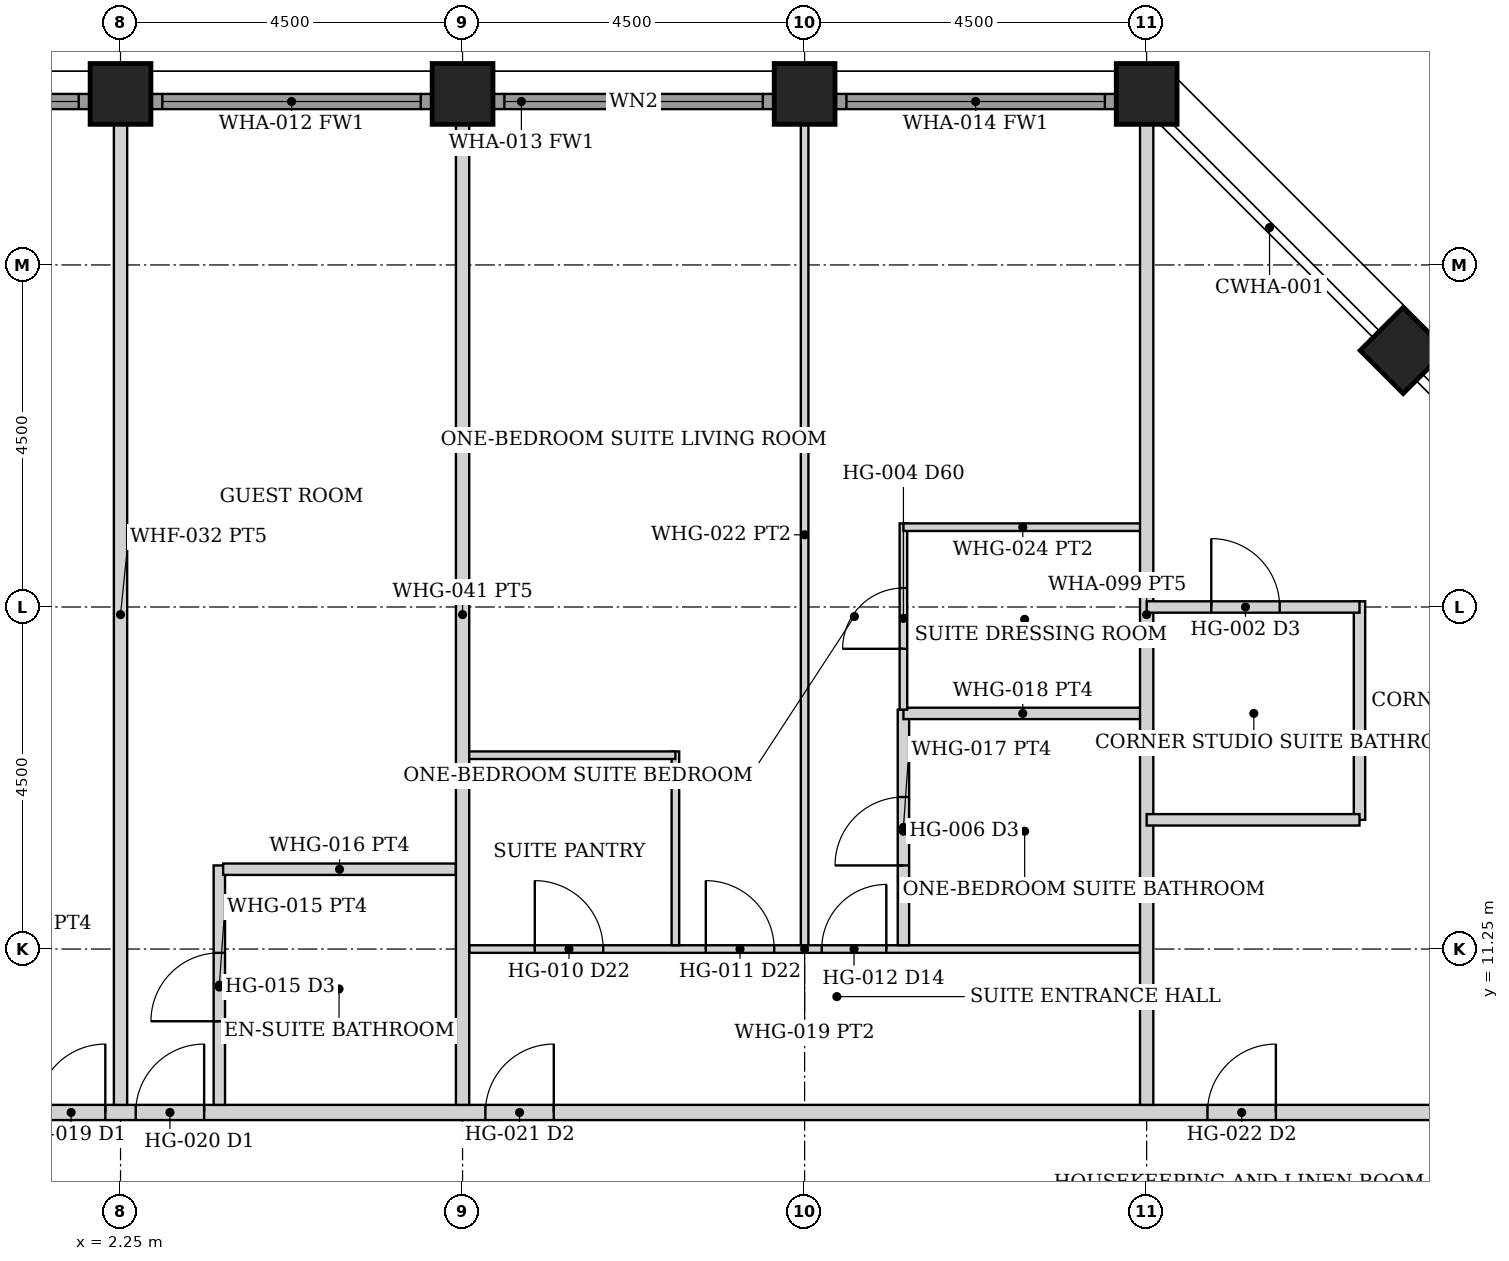
"""IFC4 building model, lengths in metres.
Left out: names, types, materials, properties, quantities, classifications, styles, units other than length and angle.
Written with IfcOpenShell. Run it as: python <this file> out.ifc"""

import sys

from ifc_helpers import new_model, si_unit, direction, frame, frame_2d, origin, origin_2d, place, context, subcontext, project, spatial, rectangle, hollow_rectangle, extrude, element, fill, save


model = new_model("IFC4")
c1 = context("Model", 3, precision=1e-05, world=origin(), true_north=direction((0.0, 1.0)))
c2 = subcontext(c1, "Body", "Model", "MODEL_VIEW")
j1 = project(units=[si_unit("LENGTHUNIT", "METRE"), si_unit("PLANEANGLEUNIT", "RADIAN")], contexts=[c1])
p1 = place(None, origin())
s1 = spatial("IfcSite", under=j1, at=p1, CompositionType="ELEMENT")
p2 = place(p1, origin())
s2 = spatial("IfcBuilding", under=s1, at=p2, CompositionType="ELEMENT")
p3 = place(p2, frame((0.0, 0.0, 183.2)))
s3 = spatial("IfcBuildingStorey", under=s2, at=p3, CompositionType="ELEMENT", Elevation=183.2)
for number, where, z_axis, x_axis in (
    (1, (2.25, 22.5, 0.0), (0.0, 0.0, 1.0), (0.0, 1.0, 0.0)),
    (2, (6.75, 22.5, 0.0), (0.0, 0.0, 1.0), (0.0, 1.0, 0.0)),
    (3, (11.25, 22.5, 0.0), (0.0, 0.0, 1.0), (0.0, 1.0, 0.0)),
    (4, (15.75, 22.5, 0.0), (0.0, 0.0, 1.0), (0.0, 1.0, 0.0)),
    (5, (19.125, 19.125, 0.0), (0.0, 0.0, 1.0), (0.707, 0.707, 0.0)),
):
    element("IfcColumn", number, at=place(p3, frame(where, z_axis=z_axis, x_axis=x_axis)), inside=s3, PredefinedType="COLUMN", context=c2, shape_type="SweptSolid", body=[
        extrude(hollow_rectangle(XDim=0.8, YDim=0.8, WallThickness=0.045, at=origin_2d()), origin(), (0.0, 0.0, 1.0), 3.6),
    ])
p4 = place(p3, frame((-1.845, 22.4, 0.0), z_axis=(0.0, 0.0, 1.0), x_axis=(1.0, 0.0, 0.0)))
e6 = element("IfcWall", 6, at=p4, inside=s3, PredefinedType="SOLIDWALL", context=c2, shape_type="SweptSolid", body=[
    extrude(rectangle(XDim=3.69, YDim=0.2, at=frame_2d((1.845, 0.0))), origin(), (0.0, 0.0, 1.0), 2.479),
])
p5 = place(p4, frame((0.145, 0.0, 0.3)))
e7 = element("IfcOpeningElement", 7, at=p5, cuts=e6, PredefinedType="OPENING", context=c2, shape_type="SweptSolid", body=[
    extrude(rectangle(XDim=3.4, YDim=2.029, at=frame_2d((1.7, 1.015))), frame((0.0, 0.11, 0.0), z_axis=(0.0, -1.0, 0.0), x_axis=(1.0, 0.0, 0.0)), (0.0, 0.0, 1.0), 0.22),
])
p6 = place(p3, frame((2.655, 22.4, 0.0), z_axis=(0.0, 0.0, 1.0), x_axis=(1.0, 0.0, 0.0)))
e8 = element("IfcWall", 8, at=p6, inside=s3, PredefinedType="SOLIDWALL", context=c2, shape_type="SweptSolid", body=[
    extrude(rectangle(XDim=3.69, YDim=0.2, at=frame_2d((1.845, 0.0))), origin(), (0.0, 0.0, 1.0), 2.479),
])
p7 = place(p6, frame((0.145, 0.0, 0.3)))
e9 = element("IfcOpeningElement", 9, at=p7, cuts=e8, PredefinedType="OPENING", context=c2, shape_type="SweptSolid", body=[
    extrude(rectangle(XDim=3.4, YDim=2.029, at=frame_2d((1.7, 1.015))), frame((0.0, 0.11, 0.0), z_axis=(0.0, -1.0, 0.0), x_axis=(1.0, 0.0, 0.0)), (0.0, 0.0, 1.0), 0.22),
])
p8 = place(p3, frame((7.155, 22.4, 0.0), z_axis=(0.0, 0.0, 1.0), x_axis=(1.0, 0.0, 0.0)))
e10 = element("IfcWall", 10, at=p8, inside=s3, PredefinedType="SOLIDWALL", context=c2, shape_type="SweptSolid", body=[
    extrude(rectangle(XDim=3.69, YDim=0.2, at=frame_2d((1.845, 0.0))), origin(), (0.0, 0.0, 1.0), 2.479),
])
p9 = place(p8, frame((0.145, 0.0, 0.3)))
e11 = element("IfcOpeningElement", 11, at=p9, cuts=e10, PredefinedType="OPENING", context=c2, shape_type="SweptSolid", body=[
    extrude(rectangle(XDim=3.4, YDim=2.029, at=frame_2d((1.7, 1.015))), frame((0.0, 0.11, 0.0), z_axis=(0.0, -1.0, 0.0), x_axis=(1.0, 0.0, 0.0)), (0.0, 0.0, 1.0), 0.22),
])
p10 = place(p3, frame((11.655, 22.4, 0.0), z_axis=(0.0, 0.0, 1.0), x_axis=(1.0, 0.0, 0.0)))
e12 = element("IfcWall", 12, at=p10, inside=s3, PredefinedType="SOLIDWALL", context=c2, shape_type="SweptSolid", body=[
    extrude(rectangle(XDim=3.69, YDim=0.2, at=frame_2d((1.845, 0.0))), origin(), (0.0, 0.0, 1.0), 2.479),
])
p11 = place(p10, frame((0.145, 0.0, 0.3)))
e13 = element("IfcOpeningElement", 13, at=p11, cuts=e12, PredefinedType="OPENING", context=c2, shape_type="SweptSolid", body=[
    extrude(rectangle(XDim=3.4, YDim=2.029, at=frame_2d((1.7, 1.015))), frame((0.0, 0.11, 0.0), z_axis=(0.0, -1.0, 0.0), x_axis=(1.0, 0.0, 0.0)), (0.0, 0.0, 1.0), 0.22),
])
p12 = place(p3, frame((-22.3, 9.1, 0.0), z_axis=(0.0, 0.0, 1.0), x_axis=(1.0, 0.0, 0.0)))
e14 = element("IfcWall", 14, at=p12, inside=s3, PredefinedType="PARTITIONING", context=c2, shape_type="SweptSolid", body=[
    extrude(rectangle(XDim=44.6, YDim=0.2, at=frame_2d((22.3, 0.0))), origin(), (0.0, 0.0, 1.0), 2.473),
])
p13 = place(p12, frame((11.35, 0.0, 0.0)))
e15 = element("IfcOpeningElement", 15, at=p13, cuts=e14, PredefinedType="OPENING", context=c2, shape_type="SweptSolid", body=[
    extrude(rectangle(XDim=0.9, YDim=2.1, at=frame_2d((0.45, 1.05))), frame((0.0, 0.11, 0.0), z_axis=(0.0, -1.0, 0.0), x_axis=(1.0, 0.0, 0.0)), (0.0, 0.0, 1.0), 0.22),
])
p14 = place(p12, frame((15.75, 0.0, 0.0)))
e16 = element("IfcOpeningElement", 16, at=p14, cuts=e14, PredefinedType="OPENING", context=c2, shape_type="SweptSolid", body=[
    extrude(rectangle(XDim=0.9, YDim=2.1, at=frame_2d((0.45, 1.05))), frame((0.0, 0.11, 0.0), z_axis=(0.0, -1.0, 0.0), x_axis=(1.0, 0.0, 0.0)), (0.0, 0.0, 1.0), 0.22),
])
p15 = place(p12, frame((23.45, 0.0, 0.0)))
e17 = element("IfcOpeningElement", 17, at=p15, cuts=e14, PredefinedType="OPENING", context=c2, shape_type="SweptSolid", body=[
    extrude(rectangle(XDim=0.9, YDim=2.1, at=frame_2d((0.45, 1.05))), frame((0.0, 0.11, 0.0), z_axis=(0.0, -1.0, 0.0), x_axis=(1.0, 0.0, 0.0)), (0.0, 0.0, 1.0), 0.22),
])
p16 = place(p12, frame((24.75, 0.0, 0.0)))
e18 = element("IfcOpeningElement", 18, at=p16, cuts=e14, PredefinedType="OPENING", context=c2, shape_type="SweptSolid", body=[
    extrude(rectangle(XDim=0.9, YDim=2.1, at=frame_2d((0.45, 1.05))), frame((0.0, 0.11, 0.0), z_axis=(0.0, -1.0, 0.0), x_axis=(1.0, 0.0, 0.0)), (0.0, 0.0, 1.0), 0.22),
])
p17 = place(p12, frame((29.35, 0.0, 0.0)))
e19 = element("IfcOpeningElement", 19, at=p17, cuts=e14, PredefinedType="OPENING", context=c2, shape_type="SweptSolid", body=[
    extrude(rectangle(XDim=0.9, YDim=2.1, at=frame_2d((0.45, 1.05))), frame((0.0, 0.11, 0.0), z_axis=(0.0, -1.0, 0.0), x_axis=(1.0, 0.0, 0.0)), (0.0, 0.0, 1.0), 0.22),
])
p18 = place(p12, frame((38.85, 0.0, 0.0)))
e20 = element("IfcOpeningElement", 20, at=p18, cuts=e14, PredefinedType="OPENING", context=c2, shape_type="SweptSolid", body=[
    extrude(rectangle(XDim=0.9, YDim=2.1, at=frame_2d((0.45, 1.05))), frame((0.0, 0.11, 0.0), z_axis=(0.0, -1.0, 0.0), x_axis=(1.0, 0.0, 0.0)), (0.0, 0.0, 1.0), 0.22),
])
p19 = place(p12, frame((4.85, 0.0, 0.0)))
e21 = element("IfcOpeningElement", 21, at=p19, cuts=e14, PredefinedType="OPENING", context=c2, shape_type="SweptSolid", body=[
    extrude(rectangle(XDim=0.9, YDim=2.1, at=frame_2d((0.45, 1.05))), frame((0.0, 0.11, 0.0), z_axis=(0.0, -1.0, 0.0), x_axis=(1.0, 0.0, 0.0)), (0.0, 0.0, 1.0), 0.22),
])
p20 = place(p3, frame((3.55, 9.2, 0.0), z_axis=(0.0, 0.0, 1.0), x_axis=(0.0, 1.0, 0.0)))
e22 = element("IfcWall", 22, at=p20, inside=s3, PredefinedType="PARTITIONING", context=c2, shape_type="SweptSolid", body=[
    extrude(rectangle(XDim=3.15, YDim=0.15, at=frame_2d((1.575, 0.0))), origin(), (0.0, 0.0, 1.0), 2.473),
])
p21 = place(p20, frame((1.1, 0.0, 0.0)))
e23 = element("IfcOpeningElement", 23, at=p21, cuts=e22, PredefinedType="OPENING", context=c2, shape_type="SweptSolid", body=[
    extrude(rectangle(XDim=0.9, YDim=2.1, at=frame_2d((0.45, 1.05))), frame((0.0, 0.085, 0.0), z_axis=(0.0, -1.0, 0.0), x_axis=(1.0, 0.0, 0.0)), (0.0, 0.0, 1.0), 0.17),
])
p22 = place(p3, frame((3.6, 12.3, 0.0), z_axis=(0.0, 0.0, 1.0), x_axis=(1.0, 0.0, 0.0)))
e24 = element("IfcWall", 24, at=p22, inside=s3, PredefinedType="PARTITIONING", context=c2, shape_type="SweptSolid", body=[
    extrude(rectangle(XDim=3.062, YDim=0.15, at=frame_2d((1.531, 0.0))), origin(), (0.0, 0.0, 1.0), 2.473),
])
p23 = place(p3, frame((6.837, 11.25, 0.0), z_axis=(0.0, 0.0, 1.0), x_axis=(1.0, 0.0, 0.0)))
e25 = element("IfcWall", 25, at=p23, inside=s3, PredefinedType="PARTITIONING", context=c2, shape_type="SweptSolid", body=[
    extrude(rectangle(XDim=8.825, YDim=0.1, at=frame_2d((4.413, 0.0))), origin(), (0.0, 0.0, 1.0), 2.473),
])
p24 = place(p23, frame((0.863, 0.0, 0.0)))
e26 = element("IfcOpeningElement", 26, at=p24, cuts=e25, PredefinedType="OPENING", context=c2, shape_type="SweptSolid", body=[
    extrude(rectangle(XDim=0.9, YDim=2.1, at=frame_2d((0.45, 1.05))), frame((0.0, 0.06, 0.0), z_axis=(0.0, -1.0, 0.0), x_axis=(1.0, 0.0, 0.0)), (0.0, 0.0, 1.0), 0.12),
])
p25 = place(p23, frame((3.113, 0.0, 0.0)))
e27 = element("IfcOpeningElement", 27, at=p25, cuts=e25, PredefinedType="OPENING", context=c2, shape_type="SweptSolid", body=[
    extrude(rectangle(XDim=0.9, YDim=2.1, at=frame_2d((0.45, 1.05))), frame((0.0, 0.06, 0.0), z_axis=(0.0, -1.0, 0.0), x_axis=(1.0, 0.0, 0.0)), (0.0, 0.0, 1.0), 0.12),
])
p26 = place(p23, frame((4.637, 0.0, 0.0)))
e28 = element("IfcOpeningElement", 28, at=p26, cuts=e25, PredefinedType="OPENING", context=c2, shape_type="SweptSolid", body=[
    extrude(rectangle(XDim=0.85, YDim=2.1, at=frame_2d((0.425, 1.05))), frame((0.0, 0.06, 0.0), z_axis=(0.0, -1.0, 0.0), x_axis=(1.0, 0.0, 0.0)), (0.0, 0.0, 1.0), 0.12),
])
p27 = place(p3, frame((9.55, 11.3, 0.0), z_axis=(0.0, 0.0, 1.0), x_axis=(0.0, 1.0, 0.0)))
e29 = element("IfcWall", 29, at=p27, inside=s3, PredefinedType="PARTITIONING", context=c2, shape_type="SweptSolid", body=[
    extrude(rectangle(XDim=2.55, YDim=0.1, at=frame_2d((1.275, 0.0))), origin(), (0.0, 0.0, 1.0), 2.473),
])
p28 = place(p3, frame((6.81, 13.8, 0.0), z_axis=(0.0, 0.0, 1.0), x_axis=(1.0, 0.0, 0.0)))
e30 = element("IfcWall", 30, at=p28, inside=s3, PredefinedType="PARTITIONING", context=c2, shape_type="SweptSolid", body=[
    extrude(rectangle(XDim=2.74, YDim=0.1, at=frame_2d((1.37, 0.0))), origin(), (0.0, 0.0, 1.0), 2.473),
])
p29 = place(p3, frame((11.25, 11.3, 0.0), z_axis=(0.0, 0.0, 1.0), x_axis=(0.0, 1.0, 0.0)))
e31 = element("IfcWall", 31, at=p29, inside=s3, PredefinedType="PARTITIONING", context=c2, shape_type="SweptSolid", body=[
    extrude(rectangle(XDim=10.8, YDim=0.1, at=frame_2d((5.4, 0.0))), origin(), (0.0, 0.0, 1.0), 2.473),
])
p30 = place(p3, frame((12.55, 11.3, 0.0), z_axis=(0.0, 0.0, 1.0), x_axis=(0.0, 1.0, 0.0)))
e32 = element("IfcWall", 32, at=p30, inside=s3, PredefinedType="PARTITIONING", context=c2, shape_type="SweptSolid", body=[
    extrude(rectangle(XDim=3.1, YDim=0.15, at=frame_2d((1.55, 0.0))), origin(), (0.0, 0.0, 1.0), 2.473),
])
p31 = place(p30, frame((1.05, 0.0, 0.0)))
e33 = element("IfcOpeningElement", 33, at=p31, cuts=e32, PredefinedType="OPENING", context=c2, shape_type="SweptSolid", body=[
    extrude(rectangle(XDim=0.9, YDim=2.1, at=frame_2d((0.45, 1.05))), frame((0.0, 0.085, 0.0), z_axis=(0.0, -1.0, 0.0), x_axis=(1.0, 0.0, 0.0)), (0.0, 0.0, 1.0), 0.17),
])
p32 = place(p3, frame((12.55, 14.35, 0.0), z_axis=(0.0, 0.0, 1.0), x_axis=(1.0, 0.0, 0.0)))
e34 = element("IfcWall", 34, at=p32, inside=s3, PredefinedType="PARTITIONING", context=c2, shape_type="SweptSolid", body=[
    extrude(rectangle(XDim=3.14, YDim=0.15, at=frame_2d((1.57, 0.0))), origin(), (0.0, 0.0, 1.0), 2.473),
])
p33 = place(p3, frame((12.55, 14.4, 0.0), z_axis=(0.0, 0.0, 1.0), x_axis=(0.0, 1.0, 0.0)))
e35 = element("IfcWall", 35, at=p33, inside=s3, PredefinedType="PARTITIONING", context=c2, shape_type="SweptSolid", body=[
    extrude(rectangle(XDim=2.45, YDim=0.1, at=frame_2d((1.225, 0.0))), origin(), (0.0, 0.0, 1.0), 2.473),
])
p34 = place(p33, frame((0.8, 0.0, 0.0)))
e36 = element("IfcOpeningElement", 36, at=p34, cuts=e35, PredefinedType="OPENING", context=c2, shape_type="SweptSolid", body=[
    extrude(rectangle(XDim=0.8, YDim=2.1, at=frame_2d((0.4, 1.05))), frame((0.0, 0.06, 0.0), z_axis=(0.0, -1.0, 0.0), x_axis=(1.0, 0.0, 0.0)), (0.0, 0.0, 1.0), 0.12),
])
p35 = place(p3, frame((12.55, 16.8, 0.0), z_axis=(0.0, 0.0, 1.0), x_axis=(1.0, 0.0, 0.0)))
e37 = element("IfcWall", 37, at=p35, inside=s3, PredefinedType="PARTITIONING", context=c2, shape_type="SweptSolid", body=[
    extrude(rectangle(XDim=3.14, YDim=0.1, at=frame_2d((1.57, 0.0))), origin(), (0.0, 0.0, 1.0), 2.473),
])
for number, where, z_axis, x_axis in (
    (38, (2.25, 9.2, 0.0), (0.0, 0.0, 1.0), (0.0, 1.0, 0.0)),
    (39, (6.75, 9.2, 0.0), (0.0, 0.0, 1.0), (0.0, 1.0, 0.0)),
    (40, (15.75, 9.2, 0.0), (0.0, 0.0, 1.0), (0.0, 1.0, 0.0)),
):
    element("IfcWall", number, at=place(p3, frame(where, z_axis=z_axis, x_axis=x_axis)), inside=s3, PredefinedType="PARTITIONING", context=c2, shape_type="SweptSolid", body=[
        extrude(rectangle(XDim=12.9, YDim=0.175, at=frame_2d((6.45, 0.0))), origin(), (0.0, 0.0, 1.0), 2.473),
    ])
p36 = place(p3, frame((18.55, 12.95, 0.0), z_axis=(0.0, 0.0, 1.0), x_axis=(0.0, 1.0, 0.0)))
e41 = element("IfcWall", 41, at=p36, inside=s3, PredefinedType="PARTITIONING", context=c2, shape_type="SweptSolid", body=[
    extrude(rectangle(XDim=2.875, YDim=0.15, at=frame_2d((1.438, 0.0))), origin(), (0.0, 0.0, 1.0), 2.473),
])
p37 = place(p3, frame((15.75, 12.95, 0.0), z_axis=(0.0, 0.0, 1.0), x_axis=(1.0, 0.0, 0.0)))
e42 = element("IfcWall", 42, at=p37, inside=s3, PredefinedType="PARTITIONING", context=c2, shape_type="SweptSolid", body=[
    extrude(rectangle(XDim=2.8, YDim=0.15, at=frame_2d((1.4, 0.0))), origin(), (0.0, 0.0, 1.0), 2.473),
])
p38 = place(p3, frame((15.75, 15.75, 0.0), z_axis=(0.0, 0.0, 1.0), x_axis=(1.0, 0.0, 0.0)))
e43 = element("IfcWall", 43, at=p38, inside=s3, PredefinedType="PARTITIONING", context=c2, shape_type="SweptSolid", body=[
    extrude(rectangle(XDim=2.8, YDim=0.15, at=frame_2d((1.4, 0.0))), origin(), (0.0, 0.0, 1.0), 2.473),
])
p39 = place(p38, frame((0.85, 0.0, 0.0)))
e44 = element("IfcOpeningElement", 44, at=p39, cuts=e43, PredefinedType="OPENING", context=c2, shape_type="SweptSolid", body=[
    extrude(rectangle(XDim=0.9, YDim=2.1, at=frame_2d((0.45, 1.05))), frame((0.0, 0.085, 0.0), z_axis=(0.0, -1.0, 0.0), x_axis=(1.0, 0.0, 0.0)), (0.0, 0.0, 1.0), 0.17),
])
p40 = place(p5, origin())
e45 = element("IfcWindow", 45, at=p40, inside=s3, PartitioningType="SINGLE_PANEL", PredefinedType="WINDOW", context=c2, shape_type="SweptSolid", body=[
    extrude(rectangle(XDim=3.4, YDim=2.029, at=frame_2d((1.7, 1.015))), frame((0.0, 0.03, 0.0), z_axis=(0.0, -1.0, 0.0), x_axis=(1.0, 0.0, 0.0)), (0.0, 0.0, 1.0), 0.06),
])
fill(e7, e45)
p41 = place(p7, origin())
e46 = element("IfcWindow", 46, at=p41, inside=s3, PartitioningType="SINGLE_PANEL", PredefinedType="WINDOW", context=c2, shape_type="SweptSolid", body=[
    extrude(rectangle(XDim=3.4, YDim=2.029, at=frame_2d((1.7, 1.015))), frame((0.0, 0.03, 0.0), z_axis=(0.0, -1.0, 0.0), x_axis=(1.0, 0.0, 0.0)), (0.0, 0.0, 1.0), 0.06),
])
fill(e9, e46)
p42 = place(p9, origin())
e47 = element("IfcWindow", 47, at=p42, inside=s3, PartitioningType="SINGLE_PANEL", PredefinedType="WINDOW", context=c2, shape_type="SweptSolid", body=[
    extrude(rectangle(XDim=3.4, YDim=2.029, at=frame_2d((1.7, 1.015))), frame((0.0, 0.03, 0.0), z_axis=(0.0, -1.0, 0.0), x_axis=(1.0, 0.0, 0.0)), (0.0, 0.0, 1.0), 0.06),
])
fill(e11, e47)
p43 = place(p11, origin())
e48 = element("IfcWindow", 48, at=p43, inside=s3, PartitioningType="SINGLE_PANEL", PredefinedType="WINDOW", context=c2, shape_type="SweptSolid", body=[
    extrude(rectangle(XDim=3.4, YDim=2.029, at=frame_2d((1.7, 1.015))), frame((0.0, 0.03, 0.0), z_axis=(0.0, -1.0, 0.0), x_axis=(1.0, 0.0, 0.0)), (0.0, 0.0, 1.0), 0.06),
])
fill(e13, e48)
p44 = place(p15, origin())
e49 = element("IfcDoor", 49, at=p44, inside=s3, OperationType="SINGLE_SWING_RIGHT", PredefinedType="DOOR", context=c2, shape_type="SweptSolid", body=[
    extrude(rectangle(XDim=0.9, YDim=2.1, at=frame_2d((0.45, 1.05))), frame((0.0, 0.025, 0.0), z_axis=(0.0, -1.0, 0.0), x_axis=(1.0, 0.0, 0.0)), (0.0, 0.0, 1.0), 0.05),
])
fill(e17, e49)
p45 = place(p16, origin())
e50 = element("IfcDoor", 50, at=p45, inside=s3, OperationType="SINGLE_SWING_RIGHT", PredefinedType="DOOR", context=c2, shape_type="SweptSolid", body=[
    extrude(rectangle(XDim=0.9, YDim=2.1, at=frame_2d((0.45, 1.05))), frame((0.0, 0.025, 0.0), z_axis=(0.0, -1.0, 0.0), x_axis=(1.0, 0.0, 0.0)), (0.0, 0.0, 1.0), 0.05),
])
fill(e18, e50)
p46 = place(p21, origin())
e51 = element("IfcDoor", 51, at=p46, inside=s3, OperationType="SINGLE_SWING_LEFT", PredefinedType="DOOR", context=c2, shape_type="SweptSolid", body=[
    extrude(rectangle(XDim=0.9, YDim=2.1, at=frame_2d((0.45, 1.05))), frame((0.0, 0.025, 0.0), z_axis=(0.0, -1.0, 0.0), x_axis=(1.0, 0.0, 0.0)), (0.0, 0.0, 1.0), 0.05),
])
fill(e23, e51)
p47 = place(p17, origin())
e52 = element("IfcDoor", 52, at=p47, inside=s3, OperationType="SINGLE_SWING_RIGHT", PredefinedType="DOOR", context=c2, shape_type="SweptSolid", body=[
    extrude(rectangle(XDim=0.9, YDim=2.1, at=frame_2d((0.45, 1.05))), frame((0.0, 0.025, 0.0), z_axis=(0.0, -1.0, 0.0), x_axis=(1.0, 0.0, 0.0)), (0.0, 0.0, 1.0), 0.05),
])
fill(e19, e52)
p48 = place(p24, origin())
e53 = element("IfcDoor", 53, at=p48, inside=s3, OperationType="SINGLE_SWING_LEFT", PredefinedType="DOOR", context=c2, shape_type="SweptSolid", body=[
    extrude(rectangle(XDim=0.9, YDim=2.1, at=frame_2d((0.45, 1.05))), frame((0.0, 0.025, 0.0), z_axis=(0.0, -1.0, 0.0), x_axis=(1.0, 0.0, 0.0)), (0.0, 0.0, 1.0), 0.05),
])
fill(e26, e53)
p49 = place(p25, origin())
e54 = element("IfcDoor", 54, at=p49, inside=s3, OperationType="SINGLE_SWING_LEFT", PredefinedType="DOOR", context=c2, shape_type="SweptSolid", body=[
    extrude(rectangle(XDim=0.9, YDim=2.1, at=frame_2d((0.45, 1.05))), frame((0.0, 0.025, 0.0), z_axis=(0.0, -1.0, 0.0), x_axis=(1.0, 0.0, 0.0)), (0.0, 0.0, 1.0), 0.05),
])
fill(e27, e54)
p50 = place(p26, origin())
e55 = element("IfcDoor", 55, at=p50, inside=s3, OperationType="SINGLE_SWING_RIGHT", PredefinedType="DOOR", context=c2, shape_type="SweptSolid", body=[
    extrude(rectangle(XDim=0.85, YDim=2.1, at=frame_2d((0.425, 1.05))), frame((0.0, 0.025, 0.0), z_axis=(0.0, -1.0, 0.0), x_axis=(1.0, 0.0, 0.0)), (0.0, 0.0, 1.0), 0.05),
])
fill(e28, e55)
p51 = place(p31, origin())
e56 = element("IfcDoor", 56, at=p51, inside=s3, OperationType="SINGLE_SWING_LEFT", PredefinedType="DOOR", context=c2, shape_type="SweptSolid", body=[
    extrude(rectangle(XDim=0.9, YDim=2.1, at=frame_2d((0.45, 1.05))), frame((0.0, 0.025, 0.0), z_axis=(0.0, -1.0, 0.0), x_axis=(1.0, 0.0, 0.0)), (0.0, 0.0, 1.0), 0.05),
])
fill(e33, e56)
p52 = place(p34, origin())
e57 = element("IfcDoor", 57, at=p52, inside=s3, OperationType="SINGLE_SWING_LEFT", PredefinedType="DOOR", context=c2, shape_type="SweptSolid", body=[
    extrude(rectangle(XDim=0.8, YDim=2.1, at=frame_2d((0.4, 1.05))), frame((0.0, 0.025, 0.0), z_axis=(0.0, -1.0, 0.0), x_axis=(1.0, 0.0, 0.0)), (0.0, 0.0, 1.0), 0.05),
])
fill(e36, e57)
p53 = place(p18, origin())
e58 = element("IfcDoor", 58, at=p53, inside=s3, OperationType="SINGLE_SWING_RIGHT", PredefinedType="DOOR", context=c2, shape_type="SweptSolid", body=[
    extrude(rectangle(XDim=0.9, YDim=2.1, at=frame_2d((0.45, 1.05))), frame((0.0, 0.025, 0.0), z_axis=(0.0, -1.0, 0.0), x_axis=(1.0, 0.0, 0.0)), (0.0, 0.0, 1.0), 0.05),
])
fill(e20, e58)
p54 = place(p39, origin())
e59 = element("IfcDoor", 59, at=p54, inside=s3, OperationType="SINGLE_SWING_LEFT", PredefinedType="DOOR", context=c2, shape_type="SweptSolid", body=[
    extrude(rectangle(XDim=0.9, YDim=2.1, at=frame_2d((0.45, 1.05))), frame((0.0, 0.025, 0.0), z_axis=(0.0, -1.0, 0.0), x_axis=(1.0, 0.0, 0.0)), (0.0, 0.0, 1.0), 0.05),
])
fill(e44, e59)
save(model, sys.argv[1])
